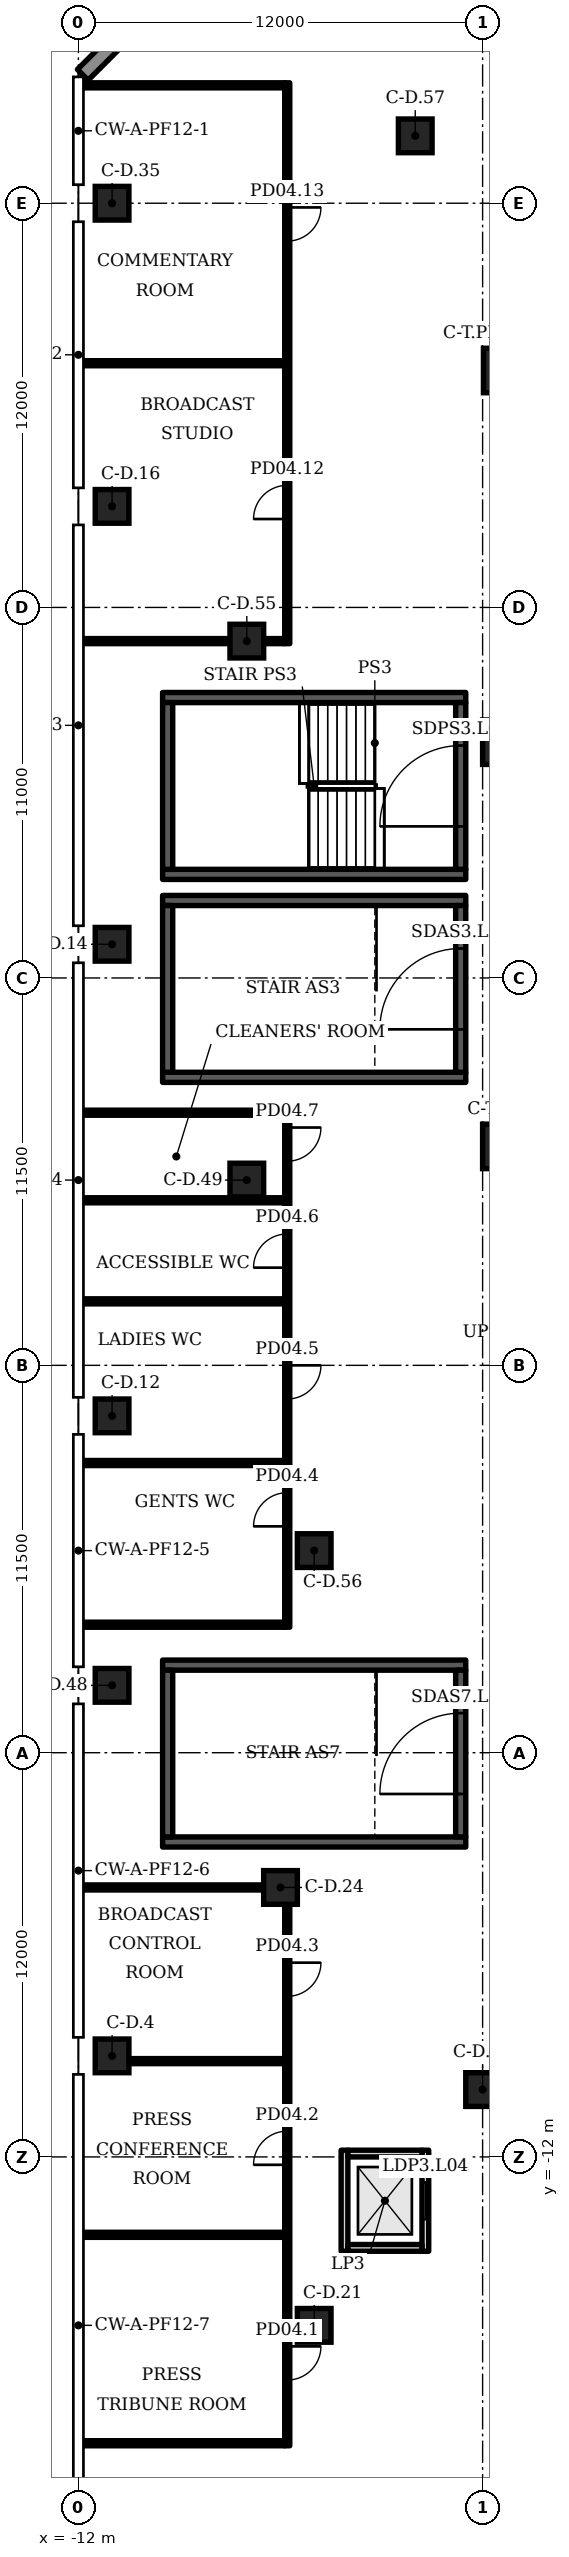
"""IFC4 building model, lengths in metres.
Left out: names, types, materials, properties, quantities, classifications, styles, units other than length and angle.
Written with IfcOpenShell. Run it as: python <this file> out.ifc"""

import sys

from ifc_helpers import new_model, si_unit, direction, frame, frame_2d, origin, origin_2d, place, context, subcontext, project, spatial, rectangle, extrude, element, fill, save


model = new_model("IFC4")
c1 = context("Model", 3, precision=1e-05, world=origin(), true_north=direction((0.0, 1.0)))
c2 = subcontext(c1, "Body", "Model", "MODEL_VIEW")
j1 = project(units=[si_unit("LENGTHUNIT", "METRE"), si_unit("PLANEANGLEUNIT", "RADIAN")], contexts=[c1])
p1 = place(None, origin())
s1 = spatial("IfcSite", under=j1, at=p1, CompositionType="ELEMENT")
p2 = place(p1, origin())
s2 = spatial("IfcBuilding", under=s1, at=p2, CompositionType="ELEMENT")
p3 = place(p2, frame((0.0, 0.0, 27.5)))
s3 = spatial("IfcBuildingStorey", under=s2, at=p3, CompositionType="ELEMENT", Elevation=27.5)
for number, where, z_axis, x_axis in (
    (1, (0.685, 41.034, 0.0), (0.0, 0.0, 1.0), (1.0, 0.0, 0.0)),
    (2, (0.66, 30.0, 0.0), (0.0, 0.0, 1.0), (1.0, 0.0, 0.0)),
    (3, (0.66, 18.0, 0.0), (0.0, 0.0, 1.0), (1.0, 0.0, 0.0)),
):
    element("IfcColumn", number, at=place(p3, frame(where, z_axis=z_axis, x_axis=x_axis)), inside=s3, PredefinedType="COLUMN", context=c2, shape_type="SweptSolid", body=[
        extrude(rectangle(XDim=1.32, YDim=1.32, at=origin_2d()), origin(), (0.0, 0.0, 1.0), 5.5),
    ])
for number, where, z_axis, x_axis in (
    (4, (-11.0, -9.0, 0.0), (0.0, 0.0, 1.0), (1.0, 0.0, 0.0)),
    (5, (-11.0, 10.0, 0.0), (0.0, 0.0, 1.0), (1.0, 0.0, 0.0)),
    (6, (-11.0, 24.0, 0.0), (0.0, 0.0, 1.0), (1.0, 0.0, 0.0)),
    (7, (-11.0, 37.0, 0.0), (0.0, 0.0, 1.0), (1.0, 0.0, 0.0)),
    (8, (-5.0, -17.0, 0.0), (0.0, 0.0, 1.0), (1.0, 0.0, 0.0)),
    (9, (-6.0, -4.0, 0.0), (0.0, 0.0, 1.0), (1.0, 0.0, 0.0)),
    (10, (-11.0, 46.0, 0.0), (0.0, 0.0, 1.0), (1.0, 0.0, 0.0)),
    (11, (0.0, -10.0, 0.0), (0.0, 0.0, 1.0), (1.0, 0.0, 0.0)),
    (12, (-11.0, 2.0, 0.0), (0.0, 0.0, 1.0), (1.0, 0.0, 0.0)),
    (13, (-7.0, 17.0, 0.0), (0.0, 0.0, 1.0), (1.0, 0.0, 0.0)),
    (14, (-7.0, 33.0, 0.0), (0.0, 0.0, 1.0), (1.0, 0.0, 0.0)),
    (15, (-5.0, 6.0, 0.0), (0.0, 0.0, 1.0), (1.0, 0.0, 0.0)),
    (16, (-2.0, 48.0, 0.0), (0.0, 0.0, 1.0), (1.0, 0.0, 0.0)),
):
    element("IfcColumn", number, at=place(p3, frame(where, z_axis=z_axis, x_axis=x_axis)), inside=s3, PredefinedType="COLUMN", context=c2, shape_type="SweptSolid", body=[
        extrude(rectangle(XDim=1.0, YDim=1.0, at=origin_2d()), origin(), (0.0, 0.0, 1.0), 5.5),
    ])
p4 = place(p3, frame((-5.912, 55.77, 0.0), z_axis=(0.0, 0.0, 1.0), x_axis=(-0.707092, -0.707121, 0.0)))
e17 = element("IfcWall", 17, at=p4, inside=s3, PredefinedType="SOLIDWALL", context=c2, shape_type="SweptSolid", body=[
    extrude(rectangle(XDim=8.425, YDim=0.45, at=frame_2d((4.213, 0.0))), origin(), (0.0, 0.0, 1.0), 5.2),
])
p5 = place(p3, frame((-11.895, -20.5, 0.0), z_axis=(0.0, 0.0, 1.0), x_axis=(1.0, 0.0, 0.0)))
e18 = element("IfcWall", 18, at=p5, inside=s3, PredefinedType="PARTITIONING", context=c2, shape_type="SweptSolid", body=[
    extrude(rectangle(XDim=6.02, YDim=0.15, at=frame_2d((3.01, 0.0))), origin(), (0.0, 0.0, 1.0), 5.2),
])
p6 = place(p3, frame((-5.8, -20.575, 0.0), z_axis=(0.0, 0.0, 1.0), x_axis=(0.0, 1.0, 0.0)))
e19 = element("IfcWall", 19, at=p6, inside=s3, PredefinedType="PARTITIONING", context=c2, shape_type="SweptSolid", body=[
    extrude(rectangle(XDim=16.065, YDim=0.15, at=frame_2d((8.032, 0.0))), origin(), (0.0, 0.0, 1.0), 5.2),
])
p7 = place(p6, frame((1.951, 0.0, 0.0)))
e20 = element("IfcOpeningElement", 20, at=p7, cuts=e19, PredefinedType="OPENING", context=c2, shape_type="SweptSolid", body=[
    extrude(rectangle(XDim=1.0, YDim=2.1, at=frame_2d((0.5, 1.05))), frame((0.0, 0.085, 0.0), z_axis=(0.0, -1.0, 0.0), x_axis=(1.0, 0.0, 0.0)), (0.0, 0.0, 1.0), 0.17),
])
p8 = place(p6, frame((8.341, 0.0, 0.0)))
e21 = element("IfcOpeningElement", 21, at=p8, cuts=e19, PredefinedType="OPENING", context=c2, shape_type="SweptSolid", body=[
    extrude(rectangle(XDim=1.0, YDim=2.1, at=frame_2d((0.5, 1.05))), frame((0.0, 0.085, 0.0), z_axis=(0.0, -1.0, 0.0), x_axis=(1.0, 0.0, 0.0)), (0.0, 0.0, 1.0), 0.17),
])
p9 = place(p6, frame((13.342, 0.0, 0.0)))
e22 = element("IfcOpeningElement", 22, at=p9, cuts=e19, PredefinedType="OPENING", context=c2, shape_type="SweptSolid", body=[
    extrude(rectangle(XDim=1.0, YDim=2.1, at=frame_2d((0.5, 1.05))), frame((0.0, 0.085, 0.0), z_axis=(0.0, -1.0, 0.0), x_axis=(1.0, 0.0, 0.0)), (0.0, 0.0, 1.0), 0.17),
])
p10 = place(p3, frame((-5.8, 3.725, 0.0), z_axis=(0.0, 0.0, 1.0), x_axis=(0.0, 1.0, 0.0)))
e23 = element("IfcWall", 23, at=p10, inside=s3, PredefinedType="PARTITIONING", context=c2, shape_type="SweptSolid", body=[
    extrude(rectangle(XDim=15.35, YDim=0.15, at=frame_2d((7.675, 0.0))), origin(), (0.0, 0.0, 1.0), 5.2),
])
p11 = place(p10, frame((2.995, 0.0, 0.0)))
e24 = element("IfcOpeningElement", 24, at=p11, cuts=e23, PredefinedType="OPENING", context=c2, shape_type="SweptSolid", body=[
    extrude(rectangle(XDim=1.0, YDim=2.1, at=frame_2d((0.5, 1.05))), frame((0.0, 0.085, 0.0), z_axis=(0.0, -1.0, 0.0), x_axis=(1.0, 0.0, 0.0)), (0.0, 0.0, 1.0), 0.17),
])
p12 = place(p10, frame((6.775, 0.0, 0.0)))
e25 = element("IfcOpeningElement", 25, at=p12, cuts=e23, PredefinedType="OPENING", context=c2, shape_type="SweptSolid", body=[
    extrude(rectangle(XDim=1.0, YDim=2.1, at=frame_2d((0.5, 1.05))), frame((0.0, 0.085, 0.0), z_axis=(0.0, -1.0, 0.0), x_axis=(1.0, 0.0, 0.0)), (0.0, 0.0, 1.0), 0.17),
])
p13 = place(p10, frame((10.675, 0.0, 0.0)))
e26 = element("IfcOpeningElement", 26, at=p13, cuts=e23, PredefinedType="OPENING", context=c2, shape_type="SweptSolid", body=[
    extrude(rectangle(XDim=1.0, YDim=2.1, at=frame_2d((0.5, 1.05))), frame((0.0, 0.085, 0.0), z_axis=(0.0, -1.0, 0.0), x_axis=(1.0, 0.0, 0.0)), (0.0, 0.0, 1.0), 0.17),
])
p14 = place(p10, frame((13.835, 0.0, 0.0)))
e27 = element("IfcOpeningElement", 27, at=p14, cuts=e23, PredefinedType="OPENING", context=c2, shape_type="SweptSolid", body=[
    extrude(rectangle(XDim=1.0, YDim=2.1, at=frame_2d((0.5, 1.05))), frame((0.0, 0.085, 0.0), z_axis=(0.0, -1.0, 0.0), x_axis=(1.0, 0.0, 0.0)), (0.0, 0.0, 1.0), 0.17),
])
p15 = place(p3, frame((-5.8, 32.925, 0.0), z_axis=(0.0, 0.0, 1.0), x_axis=(0.0, 1.0, 0.0)))
e28 = element("IfcWall", 28, at=p15, inside=s3, PredefinedType="PARTITIONING", context=c2, shape_type="SweptSolid", body=[
    extrude(rectangle(XDim=16.65, YDim=0.15, at=frame_2d((8.325, 0.0))), origin(), (0.0, 0.0, 1.0), 5.2),
])
p16 = place(p15, frame((3.7, 0.0, 0.0)))
e29 = element("IfcOpeningElement", 29, at=p16, cuts=e28, PredefinedType="OPENING", context=c2, shape_type="SweptSolid", body=[
    extrude(rectangle(XDim=1.0, YDim=2.1, at=frame_2d((0.5, 1.05))), frame((0.0, 0.085, 0.0), z_axis=(0.0, -1.0, 0.0), x_axis=(1.0, 0.0, 0.0)), (0.0, 0.0, 1.0), 0.17),
])
p17 = place(p15, frame((11.95, 0.0, 0.0)))
e30 = element("IfcOpeningElement", 30, at=p17, cuts=e28, PredefinedType="OPENING", context=c2, shape_type="SweptSolid", body=[
    extrude(rectangle(XDim=1.0, YDim=2.1, at=frame_2d((0.5, 1.05))), frame((0.0, 0.085, 0.0), z_axis=(0.0, -1.0, 0.0), x_axis=(1.0, 0.0, 0.0)), (0.0, 0.0, 1.0), 0.17),
])
p18 = place(p3, frame((-11.895, -14.312, 0.0), z_axis=(0.0, 0.0, 1.0), x_axis=(1.0, 0.0, 0.0)))
e31 = element("IfcWall", 31, at=p18, inside=s3, PredefinedType="PARTITIONING", context=c2, shape_type="SweptSolid", body=[
    extrude(rectangle(XDim=6.02, YDim=0.15, at=frame_2d((3.01, 0.0))), origin(), (0.0, 0.0, 1.0), 5.2),
])
p19 = place(p3, frame((-10.49, -9.156, 0.0), z_axis=(0.0, 0.0, 1.0), x_axis=(1.0, 0.0, 0.0)))
e32 = element("IfcWall", 32, at=p19, inside=s3, PredefinedType="PARTITIONING", context=c2, shape_type="SweptSolid", body=[
    extrude(rectangle(XDim=4.615, YDim=0.15, at=frame_2d((2.308, 0.0))), origin(), (0.0, 0.0, 1.0), 5.2),
])
p20 = place(p3, frame((-11.895, -4.0, 0.0), z_axis=(0.0, 0.0, 1.0), x_axis=(1.0, 0.0, 0.0)))
e33 = element("IfcWall", 33, at=p20, inside=s3, PredefinedType="PARTITIONING", context=c2, shape_type="SweptSolid", body=[
    extrude(rectangle(XDim=5.385, YDim=0.15, at=frame_2d((2.692, 0.0))), origin(), (0.0, 0.0, 1.0), 5.2),
])
for number, where, z_axis, x_axis in (
    (34, (-11.895, 3.8, 0.0), (0.0, 0.0, 1.0), (1.0, 0.0, 0.0)),
    (35, (-11.895, 8.6, 0.0), (0.0, 0.0, 1.0), (1.0, 0.0, 0.0)),
    (36, (-11.895, 13.4, 0.0), (0.0, 0.0, 1.0), (1.0, 0.0, 0.0)),
    (37, (-11.895, 16.4, 0.0), (0.0, 0.0, 1.0), (1.0, 0.0, 0.0)),
    (38, (-11.895, 19.0, 0.0), (0.0, 0.0, 1.0), (1.0, 0.0, 0.0)),
):
    element("IfcWall", number, at=place(p3, frame(where, z_axis=z_axis, x_axis=x_axis)), inside=s3, PredefinedType="PARTITIONING", context=c2, shape_type="SweptSolid", body=[
        extrude(rectangle(XDim=6.02, YDim=0.15, at=frame_2d((3.01, 0.0))), origin(), (0.0, 0.0, 1.0), 5.2),
    ])
p21 = place(p3, frame((-11.895, 33.0, 0.0), z_axis=(0.0, 0.0, 1.0), x_axis=(1.0, 0.0, 0.0)))
e39 = element("IfcWall", 39, at=p21, inside=s3, PredefinedType="PARTITIONING", context=c2, shape_type="SweptSolid", body=[
    extrude(rectangle(XDim=4.385, YDim=0.15, at=frame_2d((2.192, 0.0))), origin(), (0.0, 0.0, 1.0), 5.2),
])
p22 = place(p3, frame((-6.49, 33.0, 0.0), z_axis=(0.0, 0.0, 1.0), x_axis=(1.0, 0.0, 0.0)))
e40 = element("IfcWall", 40, at=p22, inside=s3, PredefinedType="PARTITIONING", context=c2, shape_type="SweptSolid", body=[
    extrude(rectangle(XDim=0.615, YDim=0.15, at=frame_2d((0.308, 0.0))), origin(), (0.0, 0.0, 1.0), 5.2),
])
for number, where, z_axis, x_axis in (
    (41, (-11.895, 41.25, 0.0), (0.0, 0.0, 1.0), (1.0, 0.0, 0.0)),
    (42, (-11.895, 49.5, 0.0), (0.0, 0.0, 1.0), (1.0, 0.0, 0.0)),
):
    element("IfcWall", number, at=place(p3, frame(where, z_axis=z_axis, x_axis=x_axis)), inside=s3, PredefinedType="PARTITIONING", context=c2, shape_type="SweptSolid", body=[
        extrude(rectangle(XDim=6.02, YDim=0.15, at=frame_2d((3.01, 0.0))), origin(), (0.0, 0.0, 1.0), 5.2),
    ])
for number, where, z_axis, x_axis in (
    (43, (-9.5, -2.65, 0.0), (0.0, 0.0, 1.0), (1.0, 0.0, 0.0)),
    (44, (-9.5, 2.6, 0.0), (0.0, 0.0, 1.0), (1.0, 0.0, 0.0)),
):
    element("IfcWall", number, at=place(p3, frame(where, z_axis=z_axis, x_axis=x_axis)), inside=s3, PredefinedType="SHEAR", context=c2, shape_type="SweptSolid", body=[
        extrude(rectangle(XDim=9.0, YDim=0.3, at=frame_2d((4.5, 0.0))), origin(), (0.0, 0.0, 1.0), 5.2),
    ])
p23 = place(p3, frame((-9.35, -2.5, 0.0), z_axis=(0.0, 0.0, 1.0), x_axis=(0.0, 1.0, 0.0)))
e45 = element("IfcWall", 45, at=p23, inside=s3, PredefinedType="SHEAR", context=c2, shape_type="SweptSolid", body=[
    extrude(rectangle(XDim=4.95, YDim=0.3, at=frame_2d((2.475, 0.0))), origin(), (0.0, 0.0, 1.0), 5.2),
])
p24 = place(p3, frame((-0.65, -2.5, 0.0), z_axis=(0.0, 0.0, 1.0), x_axis=(0.0, 1.0, 0.0)))
e46 = element("IfcWall", 46, at=p24, inside=s3, PredefinedType="SHEAR", context=c2, shape_type="SweptSolid", body=[
    extrude(rectangle(XDim=4.95, YDim=0.3, at=frame_2d((2.475, 0.0))), origin(), (0.0, 0.0, 1.0), 5.2),
])
p25 = place(p24, frame((1.275, 0.0, 0.0)))
e47 = element("IfcOpeningElement", 47, at=p25, cuts=e46, PredefinedType="OPENING", context=c2, shape_type="SweptSolid", body=[
    extrude(rectangle(XDim=2.4, YDim=2.1, at=frame_2d((1.2, 1.05))), frame((0.0, 0.16, 0.0), z_axis=(0.0, -1.0, 0.0), x_axis=(1.0, 0.0, 0.0)), (0.0, 0.0, 1.0), 0.32),
])
for number, where, z_axis, x_axis in (
    (48, (-9.5, 20.05, 0.0), (0.0, 0.0, 1.0), (1.0, 0.0, 0.0)),
    (49, (-9.5, 25.3, 0.0), (0.0, 0.0, 1.0), (1.0, 0.0, 0.0)),
):
    element("IfcWall", number, at=place(p3, frame(where, z_axis=z_axis, x_axis=x_axis)), inside=s3, PredefinedType="SHEAR", context=c2, shape_type="SweptSolid", body=[
        extrude(rectangle(XDim=9.0, YDim=0.3, at=frame_2d((4.5, 0.0))), origin(), (0.0, 0.0, 1.0), 5.2),
    ])
p26 = place(p3, frame((-9.35, 20.2, 0.0), z_axis=(0.0, 0.0, 1.0), x_axis=(0.0, 1.0, 0.0)))
e50 = element("IfcWall", 50, at=p26, inside=s3, PredefinedType="SHEAR", context=c2, shape_type="SweptSolid", body=[
    extrude(rectangle(XDim=4.95, YDim=0.3, at=frame_2d((2.475, 0.0))), origin(), (0.0, 0.0, 1.0), 5.2),
])
p27 = place(p3, frame((-0.65, 20.2, 0.0), z_axis=(0.0, 0.0, 1.0), x_axis=(0.0, 1.0, 0.0)))
e51 = element("IfcWall", 51, at=p27, inside=s3, PredefinedType="SHEAR", context=c2, shape_type="SweptSolid", body=[
    extrude(rectangle(XDim=4.95, YDim=0.3, at=frame_2d((2.475, 0.0))), origin(), (0.0, 0.0, 1.0), 5.2),
])
p28 = place(p27, frame((1.275, 0.0, 0.0)))
e52 = element("IfcOpeningElement", 52, at=p28, cuts=e51, PredefinedType="OPENING", context=c2, shape_type="SweptSolid", body=[
    extrude(rectangle(XDim=2.4, YDim=2.1, at=frame_2d((1.2, 1.05))), frame((0.0, 0.16, 0.0), z_axis=(0.0, -1.0, 0.0), x_axis=(1.0, 0.0, 0.0)), (0.0, 0.0, 1.0), 0.32),
])
for number, where, z_axis, x_axis in (
    (53, (-9.5, 26.075, 0.0), (0.0, 0.0, 1.0), (1.0, 0.0, 0.0)),
    (54, (-9.5, 31.325, 0.0), (0.0, 0.0, 1.0), (1.0, 0.0, 0.0)),
):
    element("IfcWall", number, at=place(p3, frame(where, z_axis=z_axis, x_axis=x_axis)), inside=s3, PredefinedType="SHEAR", context=c2, shape_type="SweptSolid", body=[
        extrude(rectangle(XDim=9.0, YDim=0.3, at=frame_2d((4.5, 0.0))), origin(), (0.0, 0.0, 1.0), 5.2),
    ])
p29 = place(p3, frame((-9.35, 26.225, 0.0), z_axis=(0.0, 0.0, 1.0), x_axis=(0.0, 1.0, 0.0)))
e55 = element("IfcWall", 55, at=p29, inside=s3, PredefinedType="SHEAR", context=c2, shape_type="SweptSolid", body=[
    extrude(rectangle(XDim=4.95, YDim=0.3, at=frame_2d((2.475, 0.0))), origin(), (0.0, 0.0, 1.0), 5.2),
])
p30 = place(p3, frame((-0.65, 26.225, 0.0), z_axis=(0.0, 0.0, 1.0), x_axis=(0.0, 1.0, 0.0)))
e56 = element("IfcWall", 56, at=p30, inside=s3, PredefinedType="SHEAR", context=c2, shape_type="SweptSolid", body=[
    extrude(rectangle(XDim=4.95, YDim=0.3, at=frame_2d((2.475, 0.0))), origin(), (0.0, 0.0, 1.0), 5.2),
])
p31 = place(p30, frame((1.275, 0.0, 0.0)))
e57 = element("IfcOpeningElement", 57, at=p31, cuts=e56, PredefinedType="OPENING", context=c2, shape_type="SweptSolid", body=[
    extrude(rectangle(XDim=2.4, YDim=2.1, at=frame_2d((1.2, 1.05))), frame((0.0, 0.16, 0.0), z_axis=(0.0, -1.0, 0.0), x_axis=(1.0, 0.0, 0.0)), (0.0, 0.0, 1.0), 0.32),
])
p32 = place(p3, frame((-4.1, -14.8, 0.0), z_axis=(0.0, 0.0, 1.0), x_axis=(0.0, 1.0, 0.0)))
e58 = element("IfcWall", 58, at=p32, inside=s3, PredefinedType="PARTITIONING", context=c2, shape_type="SweptSolid", body=[
    extrude(rectangle(XDim=3.0, YDim=0.2, at=frame_2d((1.5, 0.0))), origin(), (0.0, 0.0, 1.0), 5.2),
])
p33 = place(p3, frame((-1.7, -14.8, 0.0), z_axis=(0.0, 0.0, 1.0), x_axis=(0.0, 1.0, 0.0)))
e59 = element("IfcWall", 59, at=p33, inside=s3, PredefinedType="PARTITIONING", context=c2, shape_type="SweptSolid", body=[
    extrude(rectangle(XDim=3.0, YDim=0.2, at=frame_2d((1.5, 0.0))), origin(), (0.0, 0.0, 1.0), 5.2),
])
p34 = place(p33, frame((0.95, 0.0, 0.0)))
e60 = element("IfcOpeningElement", 60, at=p34, cuts=e59, PredefinedType="OPENING", context=c2, shape_type="SweptSolid", body=[
    extrude(rectangle(XDim=1.1, YDim=2.1, at=frame_2d((0.55, 1.05))), frame((0.0, 0.11, 0.0), z_axis=(0.0, -1.0, 0.0), x_axis=(1.0, 0.0, 0.0)), (0.0, 0.0, 1.0), 0.22),
])
for number, where, z_axis, x_axis in (
    (61, (-4.0, -14.7, 0.0), (0.0, 0.0, 1.0), (1.0, 0.0, 0.0)),
    (62, (-4.0, -11.9, 0.0), (0.0, 0.0, 1.0), (1.0, 0.0, 0.0)),
):
    element("IfcWall", number, at=place(p3, frame(where, z_axis=z_axis, x_axis=x_axis)), inside=s3, PredefinedType="PARTITIONING", context=c2, shape_type="SweptSolid", body=[
        extrude(rectangle(XDim=2.2, YDim=0.2, at=frame_2d((1.1, 0.0))), origin(), (0.0, 0.0, 1.0), 5.2),
    ])
p35 = place(p7, origin())
e63 = element("IfcDoor", 63, at=p35, inside=s3, OperationType="SINGLE_SWING_RIGHT", PredefinedType="DOOR", context=c2, shape_type="SweptSolid", body=[
    extrude(rectangle(XDim=1.0, YDim=2.1, at=frame_2d((0.5, 1.05))), frame((0.0, 0.025, 0.0), z_axis=(0.0, -1.0, 0.0), x_axis=(1.0, 0.0, 0.0)), (0.0, 0.0, 1.0), 0.05),
])
fill(e20, e63)
p36 = place(p8, origin())
e64 = element("IfcDoor", 64, at=p36, inside=s3, OperationType="SINGLE_SWING_LEFT", PredefinedType="DOOR", context=c2, shape_type="SweptSolid", body=[
    extrude(rectangle(XDim=1.0, YDim=2.1, at=frame_2d((0.5, 1.05))), frame((0.0, 0.025, 0.0), z_axis=(0.0, -1.0, 0.0), x_axis=(1.0, 0.0, 0.0)), (0.0, 0.0, 1.0), 0.05),
])
fill(e21, e64)
p37 = place(p9, origin())
e65 = element("IfcDoor", 65, at=p37, inside=s3, OperationType="SINGLE_SWING_RIGHT", PredefinedType="DOOR", context=c2, shape_type="SweptSolid", body=[
    extrude(rectangle(XDim=1.0, YDim=2.1, at=frame_2d((0.5, 1.05))), frame((0.0, 0.025, 0.0), z_axis=(0.0, -1.0, 0.0), x_axis=(1.0, 0.0, 0.0)), (0.0, 0.0, 1.0), 0.05),
])
fill(e22, e65)
p38 = place(p11, origin())
e66 = element("IfcDoor", 66, at=p38, inside=s3, OperationType="SINGLE_SWING_LEFT", PredefinedType="DOOR", context=c2, shape_type="SweptSolid", body=[
    extrude(rectangle(XDim=1.0, YDim=2.1, at=frame_2d((0.5, 1.05))), frame((0.0, 0.025, 0.0), z_axis=(0.0, -1.0, 0.0), x_axis=(1.0, 0.0, 0.0)), (0.0, 0.0, 1.0), 0.05),
])
fill(e24, e66)
p39 = place(p12, origin())
e67 = element("IfcDoor", 67, at=p39, inside=s3, OperationType="SINGLE_SWING_RIGHT", PredefinedType="DOOR", context=c2, shape_type="SweptSolid", body=[
    extrude(rectangle(XDim=1.0, YDim=2.1, at=frame_2d((0.5, 1.05))), frame((0.0, 0.025, 0.0), z_axis=(0.0, -1.0, 0.0), x_axis=(1.0, 0.0, 0.0)), (0.0, 0.0, 1.0), 0.05),
])
fill(e25, e67)
p40 = place(p13, origin())
e68 = element("IfcDoor", 68, at=p40, inside=s3, OperationType="SINGLE_SWING_LEFT", PredefinedType="DOOR", context=c2, shape_type="SweptSolid", body=[
    extrude(rectangle(XDim=1.0, YDim=2.1, at=frame_2d((0.5, 1.05))), frame((0.0, 0.025, 0.0), z_axis=(0.0, -1.0, 0.0), x_axis=(1.0, 0.0, 0.0)), (0.0, 0.0, 1.0), 0.05),
])
fill(e26, e68)
p41 = place(p14, origin())
e69 = element("IfcDoor", 69, at=p41, inside=s3, OperationType="SINGLE_SWING_RIGHT", PredefinedType="DOOR", context=c2, shape_type="SweptSolid", body=[
    extrude(rectangle(XDim=1.0, YDim=2.1, at=frame_2d((0.5, 1.05))), frame((0.0, 0.025, 0.0), z_axis=(0.0, -1.0, 0.0), x_axis=(1.0, 0.0, 0.0)), (0.0, 0.0, 1.0), 0.05),
])
fill(e27, e69)
p42 = place(p16, origin())
e70 = element("IfcDoor", 70, at=p42, inside=s3, OperationType="SINGLE_SWING_LEFT", PredefinedType="DOOR", context=c2, shape_type="SweptSolid", body=[
    extrude(rectangle(XDim=1.0, YDim=2.1, at=frame_2d((0.5, 1.05))), frame((0.0, 0.025, 0.0), z_axis=(0.0, -1.0, 0.0), x_axis=(1.0, 0.0, 0.0)), (0.0, 0.0, 1.0), 0.05),
])
fill(e29, e70)
p43 = place(p17, origin())
e71 = element("IfcDoor", 71, at=p43, inside=s3, OperationType="SINGLE_SWING_RIGHT", PredefinedType="DOOR", context=c2, shape_type="SweptSolid", body=[
    extrude(rectangle(XDim=1.0, YDim=2.1, at=frame_2d((0.5, 1.05))), frame((0.0, 0.025, 0.0), z_axis=(0.0, -1.0, 0.0), x_axis=(1.0, 0.0, 0.0)), (0.0, 0.0, 1.0), 0.05),
])
fill(e30, e71)
p44 = place(p25, origin())
e72 = element("IfcDoor", 72, at=p44, inside=s3, OperationType="DOUBLE_DOOR_SINGLE_SWING", PredefinedType="DOOR", context=c2, shape_type="SweptSolid", body=[
    extrude(rectangle(XDim=2.4, YDim=2.1, at=frame_2d((1.2, 1.05))), frame((0.0, 0.025, 0.0), z_axis=(0.0, -1.0, 0.0), x_axis=(1.0, 0.0, 0.0)), (0.0, 0.0, 1.0), 0.05),
])
fill(e47, e72)
p45 = place(p28, origin())
e73 = element("IfcDoor", 73, at=p45, inside=s3, OperationType="DOUBLE_DOOR_SINGLE_SWING", PredefinedType="DOOR", context=c2, shape_type="SweptSolid", body=[
    extrude(rectangle(XDim=2.4, YDim=2.1, at=frame_2d((1.2, 1.05))), frame((0.0, 0.025, 0.0), z_axis=(0.0, -1.0, 0.0), x_axis=(1.0, 0.0, 0.0)), (0.0, 0.0, 1.0), 0.05),
])
fill(e52, e73)
p46 = place(p31, origin())
e74 = element("IfcDoor", 74, at=p46, inside=s3, OperationType="DOUBLE_DOOR_SINGLE_SWING", PredefinedType="DOOR", context=c2, shape_type="SweptSolid", body=[
    extrude(rectangle(XDim=2.4, YDim=2.1, at=frame_2d((1.2, 1.05))), frame((0.0, 0.025, 0.0), z_axis=(0.0, -1.0, 0.0), x_axis=(1.0, 0.0, 0.0)), (0.0, 0.0, 1.0), 0.05),
])
fill(e57, e74)
p47 = place(p34, origin())
e75 = element("IfcDoor", 75, at=p47, inside=s3, OperationType="DOUBLE_DOOR_SLIDING", PredefinedType="DOOR", context=c2, shape_type="SweptSolid", body=[
    extrude(rectangle(XDim=1.1, YDim=2.1, at=frame_2d((0.55, 1.05))), frame((0.0, 0.025, 0.0), z_axis=(0.0, -1.0, 0.0), x_axis=(1.0, 0.0, 0.0)), (0.0, 0.0, 1.0), 0.05),
])
fill(e60, e75)
save(model, sys.argv[1])
